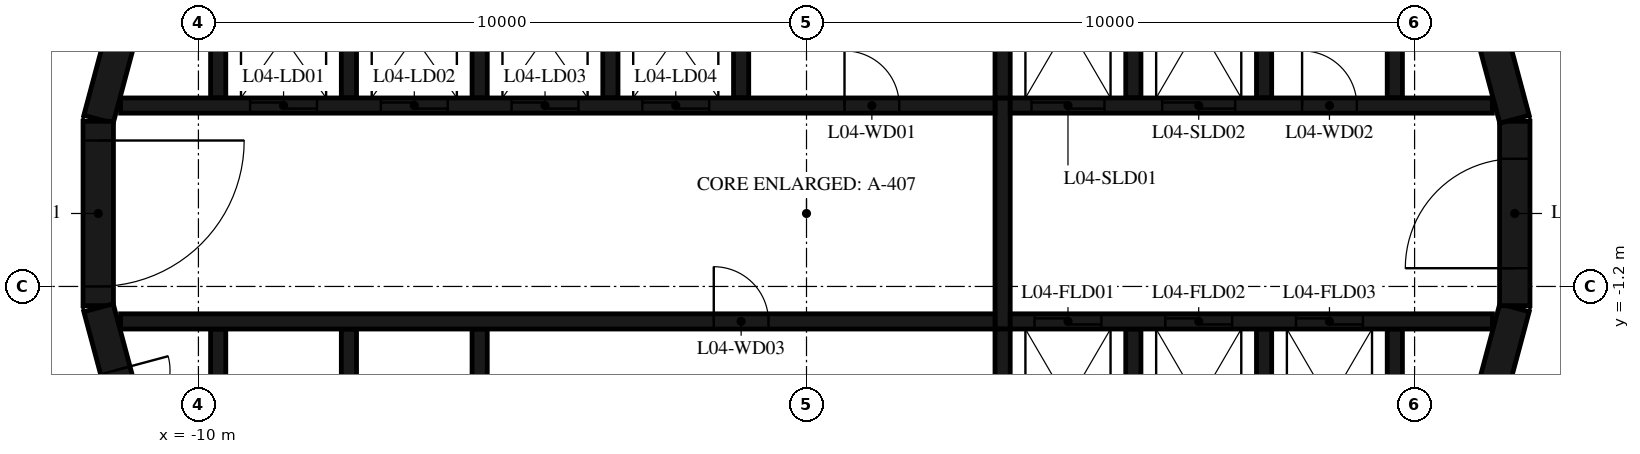
"""IFC4 building model, lengths in metres.
Left out: names, types, materials, properties, quantities, classifications, styles, units other than length and angle.
Written with IfcOpenShell. Run it as: python <this file> out.ifc"""

import sys

from ifc_helpers import new_model, si_unit, direction, frame, frame_2d, origin, place, context, subcontext, project, spatial, polyline, rectangle, outline, extrude, element, fill, save


model = new_model("IFC4")
c1 = context("Model", 3, precision=1e-05, world=origin(), true_north=direction((0.0, 1.0)))
c2 = subcontext(c1, "Body", "Model", "MODEL_VIEW")
j1 = project(units=[si_unit("LENGTHUNIT", "METRE"), si_unit("PLANEANGLEUNIT", "RADIAN")], contexts=[c1])
p1 = place(None, origin())
s1 = spatial("IfcSite", under=j1, at=p1, CompositionType="ELEMENT")
p2 = place(p1, origin())
s2 = spatial("IfcBuilding", under=s1, at=p2, CompositionType="ELEMENT")
p3 = place(p2, frame((0.0, 0.0, 23.4)))
s3 = spatial("IfcBuildingStorey", under=s2, at=p3, CompositionType="ELEMENT", Elevation=23.4)
p4 = place(p3, frame((10.858, -4.479, 0.0), z_axis=(0.0, 0.0, 1.0), x_axis=(0.258734743916, 0.965948410781, 0.0)))
e1 = element("IfcWall", 1, at=p4, inside=s3, PredefinedType="SHEAR", context=c2, shape_type="SweptSolid", body=[
    extrude(rectangle(XDim=3.033, YDim=0.5, at=frame_2d((1.516, 0.0))), origin(), (0.0, 0.0, 1.0), 4.42),
])
p5 = place(p3, frame((11.647, -1.516, 0.0), z_axis=(0.0, 0.0, 1.0), x_axis=(0.0, 1.0, 0.0)))
e2 = element("IfcWall", 2, at=p5, inside=s3, PredefinedType="SHEAR", context=c2, shape_type="SweptSolid", body=[
    extrude(rectangle(XDim=3.033, YDim=0.5, at=frame_2d((1.516, 0.0))), origin(), (0.0, 0.0, 1.0), 4.42),
])
p6 = place(p5, frame((0.616, 0.0, 0.0)))
e3 = element("IfcOpeningElement", 3, at=p6, cuts=e2, PredefinedType="OPENING", context=c2, shape_type="SweptSolid", body=[
    extrude(rectangle(XDim=1.8, YDim=2.1, at=frame_2d((0.9, 1.05))), frame((0.0, 0.26, 0.0), z_axis=(0.0, -1.0, 0.0), x_axis=(1.0, 0.0, 0.0)), (0.0, 0.0, 1.0), 0.52),
])
for number, where, z_axis, x_axis in (
    (4, (11.643, 1.55, 0.0), (0.0, 0.0, 1.0), (-0.259, 0.966, 0.0)),
    (5, (-10.858, 4.479, 0.0), (0.0, 0.0, 1.0), (-0.259, -0.966, 0.0)),
):
    element("IfcWall", number, at=place(p3, frame(where, z_axis=z_axis, x_axis=x_axis)), inside=s3, PredefinedType="SHEAR", context=c2, shape_type="SweptSolid", body=[
        extrude(rectangle(XDim=3.033, YDim=0.5, at=frame_2d((1.516, 0.0))), origin(), (0.0, 0.0, 1.0), 4.42),
    ])
p7 = place(p3, frame((-11.647, 1.516, 0.0), z_axis=(0.0, 0.0, 1.0), x_axis=(0.0, -1.0, 0.0)))
e6 = element("IfcWall", 6, at=p7, inside=s3, PredefinedType="SHEAR", context=c2, shape_type="SweptSolid", body=[
    extrude(rectangle(XDim=3.033, YDim=0.5, at=frame_2d((1.516, 0.0))), origin(), (0.0, 0.0, 1.0), 4.42),
])
p8 = place(p7, frame((0.316, 0.0, 0.0)))
e7 = element("IfcOpeningElement", 7, at=p8, cuts=e6, PredefinedType="OPENING", context=c2, shape_type="SweptSolid", body=[
    extrude(rectangle(XDim=2.4, YDim=2.1, at=frame_2d((1.2, 1.05))), frame((0.0, 0.26, 0.0), z_axis=(0.0, -1.0, 0.0), x_axis=(1.0, 0.0, 0.0)), (0.0, 0.0, 1.0), 0.52),
])
p9 = place(p3, frame((-11.643, -1.55, 0.0), z_axis=(0.0, 0.0, 1.0), x_axis=(0.258734743916, -0.965948410781, 0.0)))
e8 = element("IfcWall", 8, at=p9, inside=s3, PredefinedType="SHEAR", context=c2, shape_type="SweptSolid", body=[
    extrude(rectangle(XDim=3.033, YDim=0.5, at=frame_2d((1.516, 0.0))), origin(), (0.0, 0.0, 1.0), 4.42),
])
p10 = place(p9, frame((1.066, 0.0, 0.0)))
e9 = element("IfcOpeningElement", 9, at=p10, cuts=e8, PredefinedType="OPENING", context=c2, shape_type="SweptSolid", body=[
    extrude(rectangle(XDim=0.9, YDim=2.1, at=frame_2d((0.45, 1.05))), frame((0.0, 0.26, 0.0), z_axis=(0.0, -1.0, 0.0), x_axis=(1.0, 0.0, 0.0)), (0.0, 0.0, 1.0), 0.52),
])
p11 = place(p3, origin())
e10 = element("IfcWall", 10, at=p11, inside=s3, PredefinedType="SHEAR", context=c2, shape_type="SweptSolid", body=[
    extrude(outline(polyline([(-9.55, 4.8), (-7.65, 4.8), (-7.65, 1.9), (-7.4, 1.9), (-7.4, 4.8), (-5.5, 4.8), (-5.5, 1.9), (-5.25, 1.9), (-5.25, 4.8), (-3.35, 4.8), (-3.35, 1.9), (-3.1, 1.9), (-3.1, 4.8), (-1.2, 4.8), (-1.2, 1.9), (-0.95, 1.9), (-0.95, 4.8), (3.1, 4.8), (3.1, 1.9), (3.35, 1.9), (3.35, 4.8), (5.25, 4.8), (5.25, 1.9), (5.5, 1.9), (5.5, 4.8), (7.4, 4.8), (7.4, 1.9), (7.65, 1.9), (7.65, 4.8), (9.55, 4.8), (9.55, 1.9), (9.8, 1.9), (9.8, 4.8), (9.8, 5.05), (-9.8, 5.05), (-9.8, 4.8), (-9.8, 1.9), (-9.55, 1.9), (-9.55, 4.8)])), origin(), (0.0, 0.0, 1.0), 4.42),
])
p12 = place(p3, origin())
e11 = element("IfcWall", 11, at=p12, inside=s3, PredefinedType="SHEAR", context=c2, shape_type="SweptSolid", body=[
    extrude(outline(polyline([(9.8, -5.05), (9.8, -4.8), (9.8, -1.9), (9.55, -1.9), (9.55, -4.8), (7.65, -4.8), (7.65, -1.9), (7.4, -1.9), (7.4, -4.8), (5.5, -4.8), (5.5, -1.9), (5.25, -1.9), (5.25, -4.8), (3.35, -4.8), (3.35, -1.9), (3.1, -1.9), (3.1, -4.8), (-5.25, -4.8), (-5.25, -1.9), (-5.5, -1.9), (-5.5, -4.8), (-7.4, -4.8), (-7.4, -1.9), (-7.65, -1.9), (-7.65, -4.8), (-9.55, -4.8), (-9.55, -1.9), (-9.8, -1.9), (-9.8, -4.8), (-9.8, -5.05), (9.8, -5.05)])), origin(), (0.0, 0.0, 1.0), 4.42),
])
p13 = place(p3, frame((-11.28, 1.775, 0.0), z_axis=(0.0, 0.0, 1.0), x_axis=(1.0, 0.0, 0.0)))
e12 = element("IfcWall", 12, at=p13, inside=s3, PredefinedType="SHEAR", context=c2, shape_type="SweptSolid", body=[
    extrude(rectangle(XDim=14.38, YDim=0.25, at=frame_2d((7.19, 0.0))), origin(), (0.0, 0.0, 1.0), 4.42),
])
p14 = place(p13, frame((2.13, 0.0, 0.0)))
e13 = element("IfcOpeningElement", 13, at=p14, cuts=e12, PredefinedType="OPENING", context=c2, shape_type="SweptSolid", body=[
    extrude(rectangle(XDim=1.1, YDim=2.1, at=frame_2d((0.55, 1.05))), frame((0.0, 0.135, 0.0), z_axis=(0.0, -1.0, 0.0), x_axis=(1.0, 0.0, 0.0)), (0.0, 0.0, 1.0), 0.27),
])
p15 = place(p13, frame((4.28, 0.0, 0.0)))
e14 = element("IfcOpeningElement", 14, at=p15, cuts=e12, PredefinedType="OPENING", context=c2, shape_type="SweptSolid", body=[
    extrude(rectangle(XDim=1.1, YDim=2.1, at=frame_2d((0.55, 1.05))), frame((0.0, 0.135, 0.0), z_axis=(0.0, -1.0, 0.0), x_axis=(1.0, 0.0, 0.0)), (0.0, 0.0, 1.0), 0.27),
])
p16 = place(p13, frame((6.43, 0.0, 0.0)))
e15 = element("IfcOpeningElement", 15, at=p16, cuts=e12, PredefinedType="OPENING", context=c2, shape_type="SweptSolid", body=[
    extrude(rectangle(XDim=1.1, YDim=2.1, at=frame_2d((0.55, 1.05))), frame((0.0, 0.135, 0.0), z_axis=(0.0, -1.0, 0.0), x_axis=(1.0, 0.0, 0.0)), (0.0, 0.0, 1.0), 0.27),
])
p17 = place(p13, frame((8.58, 0.0, 0.0)))
e16 = element("IfcOpeningElement", 16, at=p17, cuts=e12, PredefinedType="OPENING", context=c2, shape_type="SweptSolid", body=[
    extrude(rectangle(XDim=1.1, YDim=2.1, at=frame_2d((0.55, 1.05))), frame((0.0, 0.135, 0.0), z_axis=(0.0, -1.0, 0.0), x_axis=(1.0, 0.0, 0.0)), (0.0, 0.0, 1.0), 0.27),
])
p18 = place(p13, frame((11.905, 0.0, 0.0)))
e17 = element("IfcOpeningElement", 17, at=p18, cuts=e12, PredefinedType="OPENING", context=c2, shape_type="SweptSolid", body=[
    extrude(rectangle(XDim=0.9, YDim=2.1, at=frame_2d((0.45, 1.05))), frame((0.0, 0.135, 0.0), z_axis=(0.0, -1.0, 0.0), x_axis=(1.0, 0.0, 0.0)), (0.0, 0.0, 1.0), 0.27),
])
p19 = place(p3, frame((3.35, 1.775, 0.0), z_axis=(0.0, 0.0, 1.0), x_axis=(1.0, 0.0, 0.0)))
e18 = element("IfcWall", 18, at=p19, inside=s3, PredefinedType="SHEAR", context=c2, shape_type="SweptSolid", body=[
    extrude(rectangle(XDim=7.93, YDim=0.25, at=frame_2d((3.965, 0.0))), origin(), (0.0, 0.0, 1.0), 4.42),
])
p20 = place(p19, frame((0.35, 0.0, 0.0)))
e19 = element("IfcOpeningElement", 19, at=p20, cuts=e18, PredefinedType="OPENING", context=c2, shape_type="SweptSolid", body=[
    extrude(rectangle(XDim=1.2, YDim=2.4, at=frame_2d((0.6, 1.2))), frame((0.0, 0.135, 0.0), z_axis=(0.0, -1.0, 0.0), x_axis=(1.0, 0.0, 0.0)), (0.0, 0.0, 1.0), 0.27),
])
p21 = place(p19, frame((2.5, 0.0, 0.0)))
e20 = element("IfcOpeningElement", 20, at=p21, cuts=e18, PredefinedType="OPENING", context=c2, shape_type="SweptSolid", body=[
    extrude(rectangle(XDim=1.2, YDim=2.4, at=frame_2d((0.6, 1.2))), frame((0.0, 0.135, 0.0), z_axis=(0.0, -1.0, 0.0), x_axis=(1.0, 0.0, 0.0)), (0.0, 0.0, 1.0), 0.27),
])
p22 = place(p19, frame((4.8, 0.0, 0.0)))
e21 = element("IfcOpeningElement", 21, at=p22, cuts=e18, PredefinedType="OPENING", context=c2, shape_type="SweptSolid", body=[
    extrude(rectangle(XDim=0.9, YDim=2.1, at=frame_2d((0.45, 1.05))), frame((0.0, 0.135, 0.0), z_axis=(0.0, -1.0, 0.0), x_axis=(1.0, 0.0, 0.0)), (0.0, 0.0, 1.0), 0.27),
])
p23 = place(p3, frame((-11.28, -1.775, 0.0), z_axis=(0.0, 0.0, 1.0), x_axis=(1.0, 0.0, 0.0)))
e22 = element("IfcWall", 22, at=p23, inside=s3, PredefinedType="SHEAR", context=c2, shape_type="SweptSolid", body=[
    extrude(rectangle(XDim=14.38, YDim=0.25, at=frame_2d((7.19, 0.0))), origin(), (0.0, 0.0, 1.0), 4.42),
])
p24 = place(p23, frame((9.755, 0.0, 0.0)))
e23 = element("IfcOpeningElement", 23, at=p24, cuts=e22, PredefinedType="OPENING", context=c2, shape_type="SweptSolid", body=[
    extrude(rectangle(XDim=0.9, YDim=2.1, at=frame_2d((0.45, 1.05))), frame((0.0, 0.135, 0.0), z_axis=(0.0, -1.0, 0.0), x_axis=(1.0, 0.0, 0.0)), (0.0, 0.0, 1.0), 0.27),
])
p25 = place(p3, frame((3.35, -1.775, 0.0), z_axis=(0.0, 0.0, 1.0), x_axis=(1.0, 0.0, 0.0)))
e24 = element("IfcWall", 24, at=p25, inside=s3, PredefinedType="SHEAR", context=c2, shape_type="SweptSolid", body=[
    extrude(rectangle(XDim=7.93, YDim=0.25, at=frame_2d((3.965, 0.0))), origin(), (0.0, 0.0, 1.0), 4.42),
])
p26 = place(p25, frame((0.4, 0.0, 0.0)))
e25 = element("IfcOpeningElement", 25, at=p26, cuts=e24, PredefinedType="OPENING", context=c2, shape_type="SweptSolid", body=[
    extrude(rectangle(XDim=1.1, YDim=2.4, at=frame_2d((0.55, 1.2))), frame((0.0, 0.135, 0.0), z_axis=(0.0, -1.0, 0.0), x_axis=(1.0, 0.0, 0.0)), (0.0, 0.0, 1.0), 0.27),
])
p27 = place(p25, frame((2.55, 0.0, 0.0)))
e26 = element("IfcOpeningElement", 26, at=p27, cuts=e24, PredefinedType="OPENING", context=c2, shape_type="SweptSolid", body=[
    extrude(rectangle(XDim=1.1, YDim=2.4, at=frame_2d((0.55, 1.2))), frame((0.0, 0.135, 0.0), z_axis=(0.0, -1.0, 0.0), x_axis=(1.0, 0.0, 0.0)), (0.0, 0.0, 1.0), 0.27),
])
p28 = place(p25, frame((4.7, 0.0, 0.0)))
e27 = element("IfcOpeningElement", 27, at=p28, cuts=e24, PredefinedType="OPENING", context=c2, shape_type="SweptSolid", body=[
    extrude(rectangle(XDim=1.1, YDim=2.4, at=frame_2d((0.55, 1.2))), frame((0.0, 0.135, 0.0), z_axis=(0.0, -1.0, 0.0), x_axis=(1.0, 0.0, 0.0)), (0.0, 0.0, 1.0), 0.27),
])
p29 = place(p3, frame((3.225, -1.9, 0.0), z_axis=(0.0, 0.0, 1.0), x_axis=(0.0, 1.0, 0.0)))
e28 = element("IfcWall", 28, at=p29, inside=s3, PredefinedType="SHEAR", context=c2, shape_type="SweptSolid", body=[
    extrude(rectangle(XDim=3.8, YDim=0.25, at=frame_2d((1.9, 0.0))), origin(), (0.0, 0.0, 1.0), 4.42),
])
p30 = place(p8, origin())
e29 = element("IfcDoor", 29, at=p30, inside=s3, OperationType="DOUBLE_DOOR_SINGLE_SWING", PredefinedType="DOOR", context=c2, shape_type="SweptSolid", body=[
    extrude(rectangle(XDim=2.4, YDim=2.1, at=frame_2d((1.2, 1.05))), frame((0.0, 0.025, 0.0), z_axis=(0.0, -1.0, 0.0), x_axis=(1.0, 0.0, 0.0)), (0.0, 0.0, 1.0), 0.05),
])
fill(e7, e29)
p31 = place(p6, origin())
e30 = element("IfcDoor", 30, at=p31, inside=s3, OperationType="DOUBLE_DOOR_SINGLE_SWING", PredefinedType="DOOR", context=c2, shape_type="SweptSolid", body=[
    extrude(rectangle(XDim=1.8, YDim=2.1, at=frame_2d((0.9, 1.05))), frame((0.0, 0.025, 0.0), z_axis=(0.0, -1.0, 0.0), x_axis=(1.0, 0.0, 0.0)), (0.0, 0.0, 1.0), 0.05),
])
fill(e3, e30)
p32 = place(p14, origin())
e31 = element("IfcDoor", 31, at=p32, inside=s3, OperationType="DOUBLE_DOOR_SLIDING", PredefinedType="DOOR", context=c2, shape_type="SweptSolid", body=[
    extrude(rectangle(XDim=1.1, YDim=2.1, at=frame_2d((0.55, 1.05))), frame((0.0, 0.025, 0.0), z_axis=(0.0, -1.0, 0.0), x_axis=(1.0, 0.0, 0.0)), (0.0, 0.0, 1.0), 0.05),
])
fill(e13, e31)
p33 = place(p15, origin())
e32 = element("IfcDoor", 32, at=p33, inside=s3, OperationType="DOUBLE_DOOR_SLIDING", PredefinedType="DOOR", context=c2, shape_type="SweptSolid", body=[
    extrude(rectangle(XDim=1.1, YDim=2.1, at=frame_2d((0.55, 1.05))), frame((0.0, 0.025, 0.0), z_axis=(0.0, -1.0, 0.0), x_axis=(1.0, 0.0, 0.0)), (0.0, 0.0, 1.0), 0.05),
])
fill(e14, e32)
p34 = place(p16, origin())
e33 = element("IfcDoor", 33, at=p34, inside=s3, OperationType="DOUBLE_DOOR_SLIDING", PredefinedType="DOOR", context=c2, shape_type="SweptSolid", body=[
    extrude(rectangle(XDim=1.1, YDim=2.1, at=frame_2d((0.55, 1.05))), frame((0.0, 0.025, 0.0), z_axis=(0.0, -1.0, 0.0), x_axis=(1.0, 0.0, 0.0)), (0.0, 0.0, 1.0), 0.05),
])
fill(e15, e33)
p35 = place(p17, origin())
e34 = element("IfcDoor", 34, at=p35, inside=s3, OperationType="DOUBLE_DOOR_SLIDING", PredefinedType="DOOR", context=c2, shape_type="SweptSolid", body=[
    extrude(rectangle(XDim=1.1, YDim=2.1, at=frame_2d((0.55, 1.05))), frame((0.0, 0.025, 0.0), z_axis=(0.0, -1.0, 0.0), x_axis=(1.0, 0.0, 0.0)), (0.0, 0.0, 1.0), 0.05),
])
fill(e16, e34)
p36 = place(p20, origin())
e35 = element("IfcDoor", 35, at=p36, inside=s3, OperationType="DOUBLE_DOOR_SLIDING", PredefinedType="DOOR", context=c2, shape_type="SweptSolid", body=[
    extrude(rectangle(XDim=1.2, YDim=2.4, at=frame_2d((0.6, 1.2))), frame((0.0, 0.025, 0.0), z_axis=(0.0, -1.0, 0.0), x_axis=(1.0, 0.0, 0.0)), (0.0, 0.0, 1.0), 0.05),
])
fill(e19, e35)
p37 = place(p21, origin())
e36 = element("IfcDoor", 36, at=p37, inside=s3, OperationType="DOUBLE_DOOR_SLIDING", PredefinedType="DOOR", context=c2, shape_type="SweptSolid", body=[
    extrude(rectangle(XDim=1.2, YDim=2.4, at=frame_2d((0.6, 1.2))), frame((0.0, 0.025, 0.0), z_axis=(0.0, -1.0, 0.0), x_axis=(1.0, 0.0, 0.0)), (0.0, 0.0, 1.0), 0.05),
])
fill(e20, e36)
p38 = place(p26, origin())
e37 = element("IfcDoor", 37, at=p38, inside=s3, OperationType="DOUBLE_DOOR_SLIDING", PredefinedType="DOOR", context=c2, shape_type="SweptSolid", body=[
    extrude(rectangle(XDim=1.1, YDim=2.4, at=frame_2d((0.55, 1.2))), frame((0.0, 0.025, 0.0), z_axis=(0.0, -1.0, 0.0), x_axis=(1.0, 0.0, 0.0)), (0.0, 0.0, 1.0), 0.05),
])
fill(e25, e37)
p39 = place(p27, origin())
e38 = element("IfcDoor", 38, at=p39, inside=s3, OperationType="DOUBLE_DOOR_SLIDING", PredefinedType="DOOR", context=c2, shape_type="SweptSolid", body=[
    extrude(rectangle(XDim=1.1, YDim=2.4, at=frame_2d((0.55, 1.2))), frame((0.0, 0.025, 0.0), z_axis=(0.0, -1.0, 0.0), x_axis=(1.0, 0.0, 0.0)), (0.0, 0.0, 1.0), 0.05),
])
fill(e26, e38)
p40 = place(p28, origin())
e39 = element("IfcDoor", 39, at=p40, inside=s3, OperationType="DOUBLE_DOOR_SLIDING", PredefinedType="DOOR", context=c2, shape_type="SweptSolid", body=[
    extrude(rectangle(XDim=1.1, YDim=2.4, at=frame_2d((0.55, 1.2))), frame((0.0, 0.025, 0.0), z_axis=(0.0, -1.0, 0.0), x_axis=(1.0, 0.0, 0.0)), (0.0, 0.0, 1.0), 0.05),
])
fill(e27, e39)
p41 = place(p18, origin())
e40 = element("IfcDoor", 40, at=p41, inside=s3, OperationType="SINGLE_SWING_RIGHT", PredefinedType="DOOR", context=c2, shape_type="SweptSolid", body=[
    extrude(rectangle(XDim=0.9, YDim=2.1, at=frame_2d((0.45, 1.05))), frame((0.0, 0.025, 0.0), z_axis=(0.0, -1.0, 0.0), x_axis=(1.0, 0.0, 0.0)), (0.0, 0.0, 1.0), 0.05),
])
fill(e17, e40)
p42 = place(p22, origin())
e41 = element("IfcDoor", 41, at=p42, inside=s3, OperationType="SINGLE_SWING_LEFT", PredefinedType="DOOR", context=c2, shape_type="SweptSolid", body=[
    extrude(rectangle(XDim=0.9, YDim=2.1, at=frame_2d((0.45, 1.05))), frame((0.0, 0.025, 0.0), z_axis=(0.0, -1.0, 0.0), x_axis=(1.0, 0.0, 0.0)), (0.0, 0.0, 1.0), 0.05),
])
fill(e21, e41)
p43 = place(p24, origin())
e42 = element("IfcDoor", 42, at=p43, inside=s3, OperationType="SINGLE_SWING_RIGHT", PredefinedType="DOOR", context=c2, shape_type="SweptSolid", body=[
    extrude(rectangle(XDim=0.9, YDim=2.1, at=frame_2d((0.45, 1.05))), frame((0.0, 0.025, 0.0), z_axis=(0.0, -1.0, 0.0), x_axis=(1.0, 0.0, 0.0)), (0.0, 0.0, 1.0), 0.05),
])
fill(e23, e42)
p44 = place(p10, origin())
e43 = element("IfcDoor", 43, at=p44, inside=s3, OperationType="SINGLE_SWING_LEFT", PredefinedType="DOOR", context=c2, shape_type="SweptSolid", body=[
    extrude(rectangle(XDim=0.9, YDim=2.1, at=frame_2d((0.45, 1.05))), frame((0.0, 0.025, 0.0), z_axis=(0.0, -1.0, 0.0), x_axis=(1.0, 0.0, 0.0)), (0.0, 0.0, 1.0), 0.05),
])
fill(e9, e43)
save(model, sys.argv[1])
